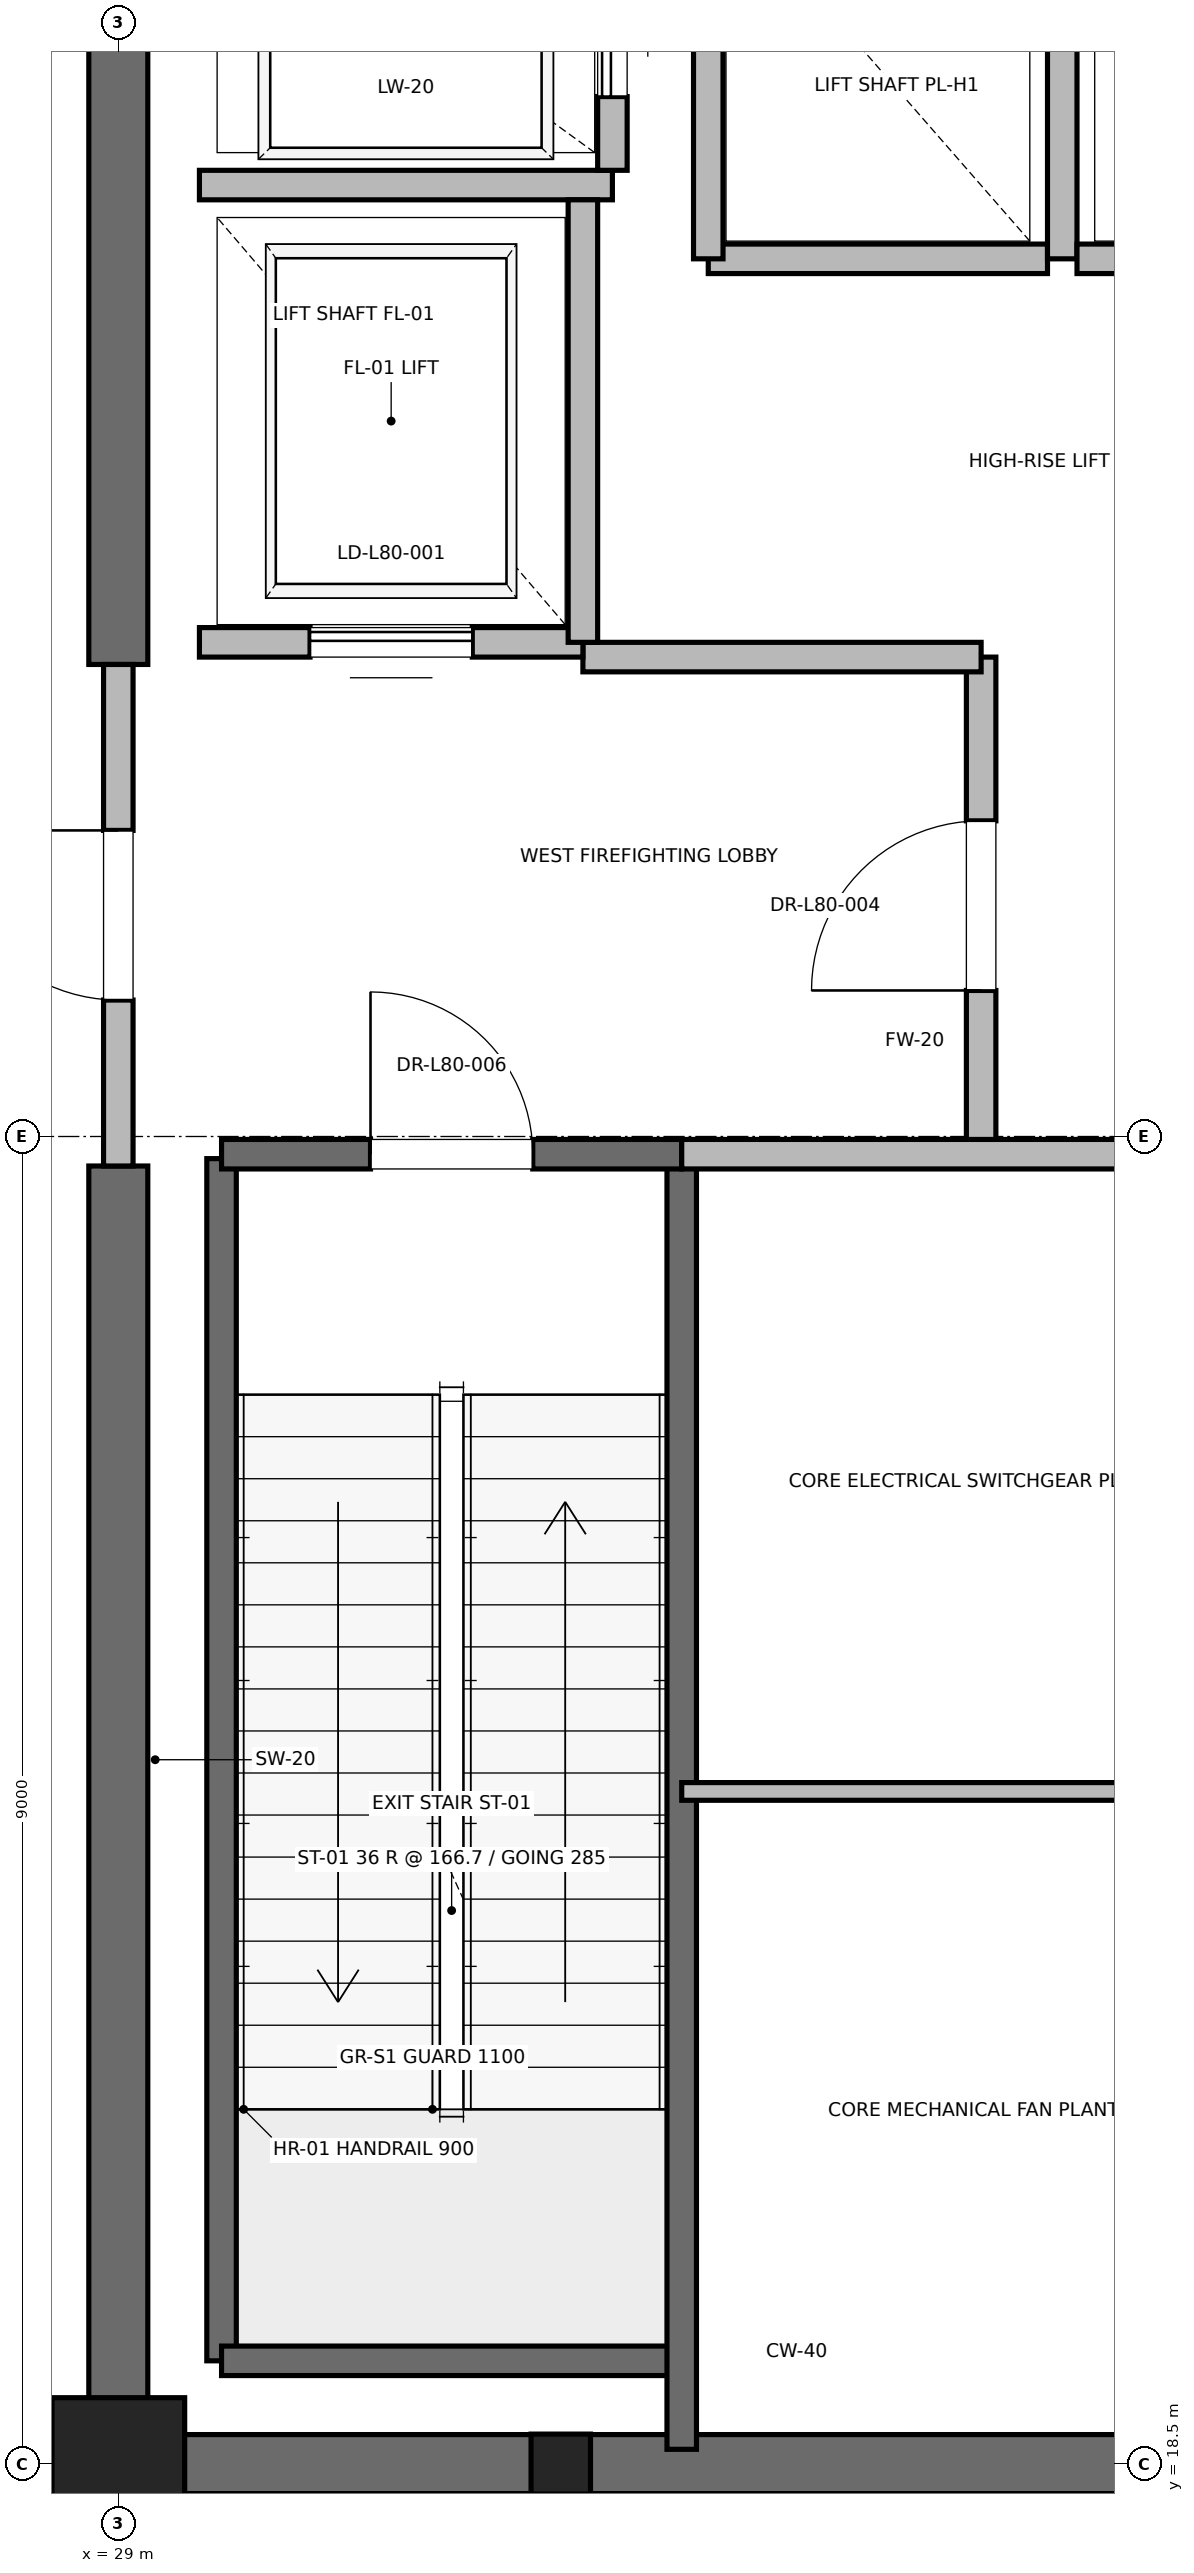
"""IFC4 building model, lengths in metres.
Left out: names, types, materials, properties, quantities, classifications, styles, units other than length and angle.
Written with IfcOpenShell. Run it as: python <this file> out.ifc"""

import sys

from ifc_helpers import new_model, si_unit, direction, frame, frame_2d, origin, origin_2d, place, context, subcontext, project, spatial, rectangle, i_section, extrude, element, fill, save


model = new_model("IFC4")
c1 = context("Model", 3, precision=1e-05, world=origin(), true_north=direction((0.0, 1.0)))
c2 = subcontext(c1, "Body", "Model", "MODEL_VIEW")
j1 = project(units=[si_unit("LENGTHUNIT", "METRE"), si_unit("PLANEANGLEUNIT", "RADIAN")], contexts=[c1])
p1 = place(None, origin())
s1 = spatial("IfcSite", under=j1, at=p1, CompositionType="ELEMENT")
p2 = place(p1, origin())
s2 = spatial("IfcBuilding", under=s1, at=p2, CompositionType="ELEMENT")
p3 = place(p2, frame((0.0, 0.0, 342.8)))
s3 = spatial("IfcBuildingStorey", under=s2, at=p3, CompositionType="ELEMENT", Elevation=342.8)
p4 = place(p3, frame((29.0, 18.5, 0.0), z_axis=(0.0, 0.0, 1.0), x_axis=(1.0, 0.0, 0.0)))
e1 = element("IfcColumn", 1, at=p4, inside=s3, PredefinedType="PILASTER", context=c2, shape_type="SweptSolid", body=[
    extrude(rectangle(XDim=0.9, YDim=0.9, at=origin_2d()), origin(), (0.0, 0.0, 1.0), 6.0),
])
p5 = place(p3, frame((32.0, 18.5, 0.0), z_axis=(0.0, 0.0, 1.0), x_axis=(1.0, 0.0, 0.0)))
e2 = element("IfcColumn", 2, at=p5, inside=s3, PredefinedType="COLUMN", context=c2, shape_type="SweptSolid", body=[
    extrude(i_section(OverallWidth=0.403, OverallDepth=0.406, WebThickness=0.027, FlangeThickness=0.043, FilletRadius=0.015, at=origin_2d()), origin(), (0.0, 0.0, 1.0), 6.0),
])
p6 = place(p3, frame((29.0, 18.5, 0.0), z_axis=(0.0, 0.0, 1.0), x_axis=(1.0, 0.0, 0.0)))
e3 = element("IfcWall", 3, at=p6, inside=s3, PredefinedType="SHEAR", context=c2, shape_type="SweptSolid", body=[
    extrude(rectangle(XDim=9.2, YDim=0.4, at=frame_2d((4.6, 0.0))), origin(), (0.0, 0.0, 1.0), 5.7),
])
p7 = place(p3, frame((29.0, 18.5, 0.0), z_axis=(0.0, 0.0, 1.0), x_axis=(0.0, 1.0, 0.0)))
e4 = element("IfcWall", 4, at=p7, inside=s3, PredefinedType="SHEAR", context=c2, shape_type="SweptSolid", body=[
    extrude(rectangle(XDim=8.8, YDim=0.4, at=frame_2d((4.4, 0.0))), origin(), (0.0, 0.0, 1.0), 5.7),
])
p8 = place(p3, frame((29.0, 30.7, 0.0), z_axis=(0.0, 0.0, 1.0), x_axis=(0.0, 1.0, 0.0)))
e5 = element("IfcWall", 5, at=p8, inside=s3, PredefinedType="SHEAR", context=c2, shape_type="SweptSolid", body=[
    extrude(rectangle(XDim=5.8, YDim=0.4, at=frame_2d((2.9, 0.0))), origin(), (0.0, 0.0, 1.0), 5.7),
])
p9 = place(p3, frame((29.7, 19.2, 0.0), z_axis=(0.0, 0.0, 1.0), x_axis=(0.0, 1.0, 0.0)))
e6 = element("IfcWall", 6, at=p9, inside=s3, PredefinedType="SOLIDWALL", context=c2, shape_type="SweptSolid", body=[
    extrude(rectangle(XDim=8.15, YDim=0.2, at=frame_2d((4.075, 0.0))), origin(), (0.0, 0.0, 1.0), 5.7),
])
p10 = place(p3, frame((29.7, 19.2, 0.0), z_axis=(0.0, 0.0, 1.0), x_axis=(1.0, 0.0, 0.0)))
e7 = element("IfcWall", 7, at=p10, inside=s3, PredefinedType="SOLIDWALL", context=c2, shape_type="SweptSolid", body=[
    extrude(rectangle(XDim=3.12, YDim=0.2, at=frame_2d((1.56, 0.0))), origin(), (0.0, 0.0, 1.0), 5.7),
])
p11 = place(p3, frame((32.82, 18.6, 0.0), z_axis=(0.0, 0.0, 1.0), x_axis=(0.0, 1.0, 0.0)))
e8 = element("IfcWall", 8, at=p11, inside=s3, PredefinedType="SOLIDWALL", context=c2, shape_type="SweptSolid", body=[
    extrude(rectangle(XDim=8.78, YDim=0.2, at=frame_2d((4.39, 0.0))), origin(), (0.0, 0.0, 1.0), 5.7),
])
p12 = place(p3, frame((29.7, 27.38, 0.0), z_axis=(0.0, 0.0, 1.0), x_axis=(1.0, 0.0, 0.0)))
e9 = element("IfcWall", 9, at=p12, inside=s3, PredefinedType="SOLIDWALL", context=c2, shape_type="SweptSolid", body=[
    extrude(rectangle(XDim=3.12, YDim=0.2, at=frame_2d((1.56, 0.0))), origin(), (0.0, 0.0, 1.0), 5.7),
])
p13 = place(p12, frame((1.01, 0.0, 0.0)))
e10 = element("IfcOpeningElement", 10, at=p13, cuts=e9, PredefinedType="OPENING", context=c2, shape_type="SweptSolid", body=[
    extrude(rectangle(XDim=1.1, YDim=2.15, at=frame_2d((0.55, 1.075))), frame((0.0, 0.1, 0.0), z_axis=(0.0, -1.0, 0.0), x_axis=(1.0, 0.0, 0.0)), (0.0, 0.0, 1.0), 0.2),
])
p14 = place(p3, frame((34.85, 27.38, 0.0), z_axis=(0.0, 0.0, 1.0), x_axis=(0.0, 1.0, 0.0)))
e11 = element("IfcWall", 11, at=p14, inside=s3, PredefinedType="PARTITIONING", context=c2, shape_type="SweptSolid", body=[
    extrude(rectangle(XDim=3.37, YDim=0.2, at=frame_2d((1.685, 0.0))), origin(), (0.0, 0.0, 1.0), 5.7),
])
p15 = place(p14, frame((1.11, 0.0, 0.0)))
e12 = element("IfcOpeningElement", 12, at=p15, cuts=e11, PredefinedType="OPENING", context=c2, shape_type="SweptSolid", body=[
    extrude(rectangle(XDim=1.15, YDim=2.2, at=frame_2d((0.575, 1.1))), frame((0.0, 0.1, 0.0), z_axis=(0.0, -1.0, 0.0), x_axis=(1.0, 0.0, 0.0)), (0.0, 0.0, 1.0), 0.2),
])
p16 = place(p3, frame((29.0, 27.3, 0.0), z_axis=(0.0, 0.0, 1.0), x_axis=(0.0, 1.0, 0.0)))
e13 = element("IfcWall", 13, at=p16, inside=s3, PredefinedType="PARTITIONING", context=c2, shape_type="SweptSolid", body=[
    extrude(rectangle(XDim=3.4, YDim=0.2, at=frame_2d((1.7, 0.0))), origin(), (0.0, 0.0, 1.0), 4.78),
])
p17 = place(p16, frame((1.125, 0.0, 0.0)))
e14 = element("IfcOpeningElement", 14, at=p17, cuts=e13, PredefinedType="OPENING", context=c2, shape_type="SweptSolid", body=[
    extrude(rectangle(XDim=1.15, YDim=2.2, at=frame_2d((0.575, 1.1))), frame((0.0, 0.1, 0.0), z_axis=(0.0, -1.0, 0.0), x_axis=(1.0, 0.0, 0.0)), (0.0, 0.0, 1.0), 0.2),
])
p18 = place(p3, frame((32.82, 27.38, 0.0), z_axis=(0.0, 0.0, 1.0), x_axis=(1.0, 0.0, 0.0)))
e15 = element("IfcWall", 15, at=p18, inside=s3, PredefinedType="PARTITIONING", context=c2, shape_type="SweptSolid", body=[
    extrude(rectangle(XDim=5.62, YDim=0.2, at=frame_2d((2.81, 0.0))), origin(), (0.0, 0.0, 1.0), 5.7),
])
p19 = place(p3, frame((32.15, 30.75, 0.0), z_axis=(0.0, 0.0, 1.0), x_axis=(1.0, 0.0, 0.0)))
e16 = element("IfcWall", 16, at=p19, inside=s3, PredefinedType="PARTITIONING", context=c2, shape_type="SweptSolid", body=[
    extrude(rectangle(XDim=2.7, YDim=0.2, at=frame_2d((1.35, 0.0))), origin(), (0.0, 0.0, 1.0), 5.7),
])
p20 = place(p3, frame((29.55, 30.85, 0.0), z_axis=(0.0, 0.0, 1.0), x_axis=(1.0, 0.0, 0.0)))
e17 = element("IfcWall", 17, at=p20, inside=s3, PredefinedType="SOLIDWALL", context=c2, shape_type="SweptSolid", body=[
    extrude(rectangle(XDim=2.6, YDim=0.2, at=frame_2d((1.3, 0.0))), origin(), (0.0, 0.0, 1.0), 4.78),
])
p21 = place(p20, frame((0.75, 0.0, 0.0)))
e18 = element("IfcOpeningElement", 18, at=p21, cuts=e17, PredefinedType="OPENING", context=c2, shape_type="SweptSolid", body=[
    extrude(rectangle(XDim=1.1, YDim=2.2, at=frame_2d((0.55, 1.1))), frame((0.0, 0.1, 0.0), z_axis=(0.0, -1.0, 0.0), x_axis=(1.0, 0.0, 0.0)), (0.0, 0.0, 1.0), 0.2),
])
p22 = place(p3, frame((29.55, 33.95, 0.0), z_axis=(0.0, 0.0, 1.0), x_axis=(1.0, 0.0, 0.0)))
e19 = element("IfcWall", 19, at=p22, inside=s3, PredefinedType="SOLIDWALL", context=c2, shape_type="SweptSolid", body=[
    extrude(rectangle(XDim=2.8, YDim=0.2, at=frame_2d((1.4, 0.0))), origin(), (0.0, 0.0, 1.0), 5.7),
])
p23 = place(p3, frame((32.15, 30.85, 0.0), z_axis=(0.0, 0.0, 1.0), x_axis=(0.0, 1.0, 0.0)))
e20 = element("IfcWall", 20, at=p23, inside=s3, PredefinedType="SOLIDWALL", context=c2, shape_type="SweptSolid", body=[
    extrude(rectangle(XDim=3.0, YDim=0.2, at=frame_2d((1.5, 0.0))), origin(), (0.0, 0.0, 1.0), 5.7),
])
p24 = place(p3, frame((32.35, 34.05, 0.0), z_axis=(0.0, 0.0, 1.0), x_axis=(0.0, 1.0, 0.0)))
e21 = element("IfcWall", 21, at=p24, inside=s3, PredefinedType="SOLIDWALL", context=c2, shape_type="SweptSolid", body=[
    extrude(rectangle(XDim=2.1, YDim=0.2, at=frame_2d((1.05, 0.0))), origin(), (0.0, 0.0, 1.0), 5.7),
])
p25 = place(p24, frame((0.5, 0.0, 0.0)))
e22 = element("IfcOpeningElement", 22, at=p25, cuts=e21, PredefinedType="OPENING", context=c2, shape_type="SweptSolid", body=[
    extrude(rectangle(XDim=1.1, YDim=2.2, at=frame_2d((0.55, 1.1))), frame((0.0, 0.1, 0.0), z_axis=(0.0, -1.0, 0.0), x_axis=(1.0, 0.0, 0.0)), (0.0, 0.0, 1.0), 0.2),
])
p26 = place(p3, frame((33.0, 33.45, 0.0), z_axis=(0.0, 0.0, 1.0), x_axis=(1.0, 0.0, 0.0)))
e23 = element("IfcWall", 23, at=p26, inside=s3, PredefinedType="SOLIDWALL", context=c2, shape_type="SweptSolid", body=[
    extrude(rectangle(XDim=2.3, YDim=0.2, at=frame_2d((1.15, 0.0))), origin(), (0.0, 0.0, 1.0), 5.7),
])
p27 = place(p3, frame((33.0, 36.05, 0.0), z_axis=(0.0, 0.0, 1.0), x_axis=(0.0, -1.0, 0.0)))
e24 = element("IfcWall", 24, at=p27, inside=s3, PredefinedType="SOLIDWALL", context=c2, shape_type="SweptSolid", body=[
    extrude(rectangle(XDim=2.6, YDim=0.2, at=frame_2d((1.3, 0.0))), origin(), (0.0, 0.0, 1.0), 5.7),
])
p28 = place(p3, frame((35.4, 33.45, 0.0), z_axis=(0.0, 0.0, 1.0), x_axis=(0.0, 1.0, 0.0)))
e25 = element("IfcWall", 25, at=p28, inside=s3, PredefinedType="SOLIDWALL", context=c2, shape_type="SweptSolid", body=[
    extrude(rectangle(XDim=2.6, YDim=0.2, at=frame_2d((1.3, 0.0))), origin(), (0.0, 0.0, 1.0), 4.78),
])
p29 = place(p3, frame((35.5, 33.45, 0.0), z_axis=(0.0, 0.0, 1.0), x_axis=(1.0, 0.0, 0.0)))
e26 = element("IfcWall", 26, at=p29, inside=s3, PredefinedType="SOLIDWALL", context=c2, shape_type="SweptSolid", body=[
    extrude(rectangle(XDim=2.3, YDim=0.2, at=frame_2d((1.15, 0.0))), origin(), (0.0, 0.0, 1.0), 5.7),
])
p30 = place(p3, frame((32.82, 23.06, 0.0), z_axis=(0.0, 0.0, 1.0), x_axis=(1.0, 0.0, 0.0)))
e27 = element("IfcWall", 27, at=p30, inside=s3, PredefinedType="PARTITIONING", context=c2, shape_type="SweptSolid", body=[
    extrude(rectangle(XDim=5.23, YDim=0.12, at=frame_2d((2.615, 0.0))), origin(), (0.0, 0.0, 1.0), 2.85),
])
p31 = place(p13, origin())
e28 = element("IfcDoor", 28, at=p31, inside=s3, OperationType="SINGLE_SWING_LEFT", PredefinedType="DOOR", context=c2, shape_type="SweptSolid", body=[
    extrude(rectangle(XDim=1.1, YDim=2.15, at=frame_2d((0.55, 1.075))), frame((0.0, 0.025, 0.0), z_axis=(0.0, -1.0, 0.0), x_axis=(1.0, 0.0, 0.0)), (0.0, 0.0, 1.0), 0.05),
])
fill(e10, e28)
p32 = place(p15, origin())
e29 = element("IfcDoor", 29, at=p32, inside=s3, OperationType="SINGLE_SWING_LEFT", PredefinedType="DOOR", context=c2, shape_type="SweptSolid", body=[
    extrude(rectangle(XDim=1.15, YDim=2.2, at=frame_2d((0.575, 1.1))), frame((0.0, 0.025, 0.0), z_axis=(0.0, -1.0, 0.0), x_axis=(1.0, 0.0, 0.0)), (0.0, 0.0, 1.0), 0.05),
])
fill(e12, e29)
p33 = place(p17, origin())
e30 = element("IfcDoor", 30, at=p33, inside=s3, OperationType="SINGLE_SWING_RIGHT", PredefinedType="DOOR", context=c2, shape_type="SweptSolid", body=[
    extrude(rectangle(XDim=1.15, YDim=2.2, at=frame_2d((0.575, 1.1))), frame((0.0, 0.025, 0.0), z_axis=(0.0, -1.0, 0.0), x_axis=(1.0, 0.0, 0.0)), (0.0, 0.0, 1.0), 0.05),
])
fill(e14, e30)
p34 = place(p21, origin())
e31 = element("IfcDoor", 31, at=p34, inside=s3, OperationType="SLIDING_TO_RIGHT", PredefinedType="DOOR", context=c2, shape_type="SweptSolid", body=[
    extrude(rectangle(XDim=1.1, YDim=2.2, at=frame_2d((0.55, 1.1))), frame((0.0, 0.025, 0.0), z_axis=(0.0, -1.0, 0.0), x_axis=(1.0, 0.0, 0.0)), (0.0, 0.0, 1.0), 0.05),
])
fill(e18, e31)
p35 = place(p25, origin())
e32 = element("IfcDoor", 32, at=p35, inside=s3, OperationType="SLIDING_TO_RIGHT", PredefinedType="DOOR", context=c2, shape_type="SweptSolid", body=[
    extrude(rectangle(XDim=1.1, YDim=2.2, at=frame_2d((0.55, 1.1))), frame((0.0, 0.025, 0.0), z_axis=(0.0, -1.0, 0.0), x_axis=(1.0, 0.0, 0.0)), (0.0, 0.0, 1.0), 0.05),
])
fill(e22, e32)
save(model, sys.argv[1])
